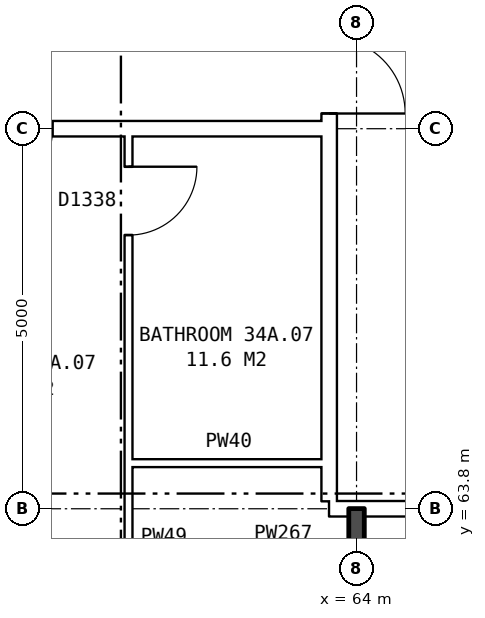
"""IFC4 building model, lengths in metres.
Left out: names, types, materials, properties, quantities, classifications, styles, units other than length and angle.
Written with IfcOpenShell. Run it as: python <this file> out.ifc"""

import sys

from ifc_helpers import new_model, si_unit, direction, frame, frame_2d, origin, place, context, subcontext, project, spatial, rectangle, extrude, element, fill, save


model = new_model("IFC4")
c1 = context("Model", 3, precision=1e-05, world=origin(), true_north=direction((0.0, 1.0)))
c2 = subcontext(c1, "Body", "Model", "MODEL_VIEW")
j1 = project(units=[si_unit("LENGTHUNIT", "METRE"), si_unit("PLANEANGLEUNIT", "RADIAN")], contexts=[c1])
p1 = place(None, origin())
s1 = spatial("IfcSite", under=j1, at=p1, CompositionType="ELEMENT")
p2 = place(p1, origin())
s2 = spatial("IfcBuilding", under=s1, at=p2, CompositionType="ELEMENT")
p3 = place(p2, frame((0.0, 0.0, 123.7)))
s3 = spatial("IfcBuildingStorey", under=s2, at=p3, CompositionType="ELEMENT", Elevation=123.7)
p4 = place(p3, frame((63.64, 63.9, 0.0), z_axis=(0.0, 0.0, 1.0), x_axis=(0.0, 1.0, 0.0)))
e1 = element("IfcWall", 1, at=p4, inside=s3, PredefinedType="PARTITIONING", context=c2, shape_type="SweptSolid", body=[
    extrude(rectangle(XDim=12.2, YDim=0.2, at=frame_2d((6.1, 0.0))), origin(), (0.0, 0.0, 1.0), 2.85),
])
p5 = place(p4, frame((5.1, 0.0, 0.0)))
e2 = element("IfcOpeningElement", 2, at=p5, cuts=e1, PredefinedType="OPENING", context=c2, shape_type="SweptSolid", body=[
    extrude(rectangle(XDim=2.0, YDim=2.1, at=frame_2d((1.0, 1.05))), frame((0.0, 0.11, 0.0), z_axis=(0.0, -1.0, 0.0), x_axis=(1.0, 0.0, 0.0)), (0.0, 0.0, 1.0), 0.22),
])
p6 = place(p3, frame((63.64, 63.8, 0.0), z_axis=(0.0, 0.0, 1.0), x_axis=(1.0, 0.0, 0.0)))
e3 = element("IfcWall", 3, at=p6, inside=s3, PredefinedType="PARTITIONING", context=c2, shape_type="SweptSolid", body=[
    extrude(rectangle(XDim=3.0, YDim=0.2, at=frame_2d((1.5, 0.0))), origin(), (0.0, 0.0, 1.0), 2.85),
])
p7 = place(p6, frame((1.18, 0.0, 0.0)))
e4 = element("IfcOpeningElement", 4, at=p7, cuts=e3, PredefinedType="OPENING", context=c2, shape_type="SweptSolid", body=[
    extrude(rectangle(XDim=1.0, YDim=2.1, at=frame_2d((0.5, 1.05))), frame((0.0, 0.11, 0.0), z_axis=(0.0, -1.0, 0.0), x_axis=(1.0, 0.0, 0.0)), (0.0, 0.0, 1.0), 0.22),
])
p8 = place(p3, frame((61.0, 64.4, 0.0), z_axis=(0.0, 0.0, 1.0), x_axis=(1.0, 0.0, 0.0)))
e5 = element("IfcWall", 5, at=p8, inside=s3, PredefinedType="PARTITIONING", context=c2, shape_type="SweptSolid", body=[
    extrude(rectangle(XDim=2.64, YDim=0.1, at=frame_2d((1.32, 0.0))), origin(), (0.0, 0.0, 1.0), 2.85),
])
p9 = place(p3, frame((44.36, 68.8, 0.0), z_axis=(0.0, 0.0, 1.0), x_axis=(1.0, 0.0, 0.0)))
e6 = element("IfcWall", 6, at=p9, inside=s3, PredefinedType="PARTITIONING", context=c2, shape_type="SweptSolid", body=[
    extrude(rectangle(XDim=19.28, YDim=0.2, at=frame_2d((9.64, 0.0))), origin(), (0.0, 0.0, 1.0), 2.85),
])
p10 = place(p9, frame((14.64, 0.0, 0.0)))
e7 = element("IfcOpeningElement", 7, at=p10, cuts=e6, PredefinedType="OPENING", context=c2, shape_type="SweptSolid", body=[
    extrude(rectangle(XDim=1.0, YDim=2.1, at=frame_2d((0.5, 1.05))), frame((0.0, 0.11, 0.0), z_axis=(0.0, -1.0, 0.0), x_axis=(1.0, 0.0, 0.0)), (0.0, 0.0, 1.0), 0.22),
])
p11 = place(p9, frame((5.64, 0.0, 0.0)))
e8 = element("IfcOpeningElement", 8, at=p11, cuts=e6, PredefinedType="OPENING", context=c2, shape_type="SweptSolid", body=[
    extrude(rectangle(XDim=1.0, YDim=2.1, at=frame_2d((0.5, 1.05))), frame((0.0, 0.11, 0.0), z_axis=(0.0, -1.0, 0.0), x_axis=(1.0, 0.0, 0.0)), (0.0, 0.0, 1.0), 0.22),
])
p12 = place(p3, frame((61.0, 54.36, 0.0), z_axis=(0.0, 0.0, 1.0), x_axis=(0.0, 1.0, 0.0)))
e9 = element("IfcWall", 9, at=p12, inside=s3, PredefinedType="PARTITIONING", context=c2, shape_type="SweptSolid", body=[
    extrude(rectangle(XDim=14.34, YDim=0.1, at=frame_2d((7.17, 0.0))), origin(), (0.0, 0.0, 1.0), 2.85),
])
p13 = place(p12, frame((4.2, 0.0, 0.0)))
e10 = element("IfcOpeningElement", 10, at=p13, cuts=e9, PredefinedType="OPENING", context=c2, shape_type="SweptSolid", body=[
    extrude(rectangle(XDim=0.9, YDim=2.1, at=frame_2d((0.45, 1.05))), frame((0.0, 0.06, 0.0), z_axis=(0.0, -1.0, 0.0), x_axis=(1.0, 0.0, 0.0)), (0.0, 0.0, 1.0), 0.12),
])
p14 = place(p12, frame((13.04, 0.0, 0.0)))
e11 = element("IfcOpeningElement", 11, at=p14, cuts=e9, PredefinedType="OPENING", context=c2, shape_type="SweptSolid", body=[
    extrude(rectangle(XDim=0.9, YDim=2.1, at=frame_2d((0.45, 1.05))), frame((0.0, 0.06, 0.0), z_axis=(0.0, -1.0, 0.0), x_axis=(1.0, 0.0, 0.0)), (0.0, 0.0, 1.0), 0.12),
])
p15 = place(p3, frame((64.0, 54.36, 0.0), z_axis=(0.0, 0.0, 1.0), x_axis=(0.0, 1.0, 0.0)))
e12 = element("IfcWall", 12, at=p15, inside=s3, PredefinedType="SOLIDWALL", context=c2, shape_type="SweptSolid", body=[
    extrude(rectangle(XDim=9.44, YDim=0.2, at=frame_2d((4.72, 0.0))), origin(), (0.0, 0.0, 1.0), 2.85),
])
p16 = place(p5, frame((2.0, 0.0, 0.0), z_axis=(0.0, 0.0, 1.0), x_axis=(-1.0, 0.0, 0.0)))
e13 = element("IfcDoor", 13, at=p16, inside=s3, OperationType="DOUBLE_DOOR_SINGLE_SWING", PredefinedType="DOOR", context=c2, shape_type="SweptSolid", body=[
    extrude(rectangle(XDim=2.0, YDim=2.1, at=frame_2d((1.0, 1.05))), frame((0.0, 0.025, 0.0), z_axis=(0.0, -1.0, 0.0), x_axis=(1.0, 0.0, 0.0)), (0.0, 0.0, 1.0), 0.05),
])
fill(e2, e13)
p17 = place(p14, frame((0.9, 0.0, 0.0), z_axis=(0.0, 0.0, 1.0), x_axis=(-1.0, 0.0, 0.0)))
e14 = element("IfcDoor", 14, at=p17, inside=s3, OperationType="SINGLE_SWING_LEFT", PredefinedType="DOOR", context=c2, shape_type="SweptSolid", body=[
    extrude(rectangle(XDim=0.9, YDim=2.1, at=frame_2d((0.45, 1.05))), frame((0.0, 0.025, 0.0), z_axis=(0.0, -1.0, 0.0), x_axis=(1.0, 0.0, 0.0)), (0.0, 0.0, 1.0), 0.05),
])
fill(e11, e14)
save(model, sys.argv[1])
